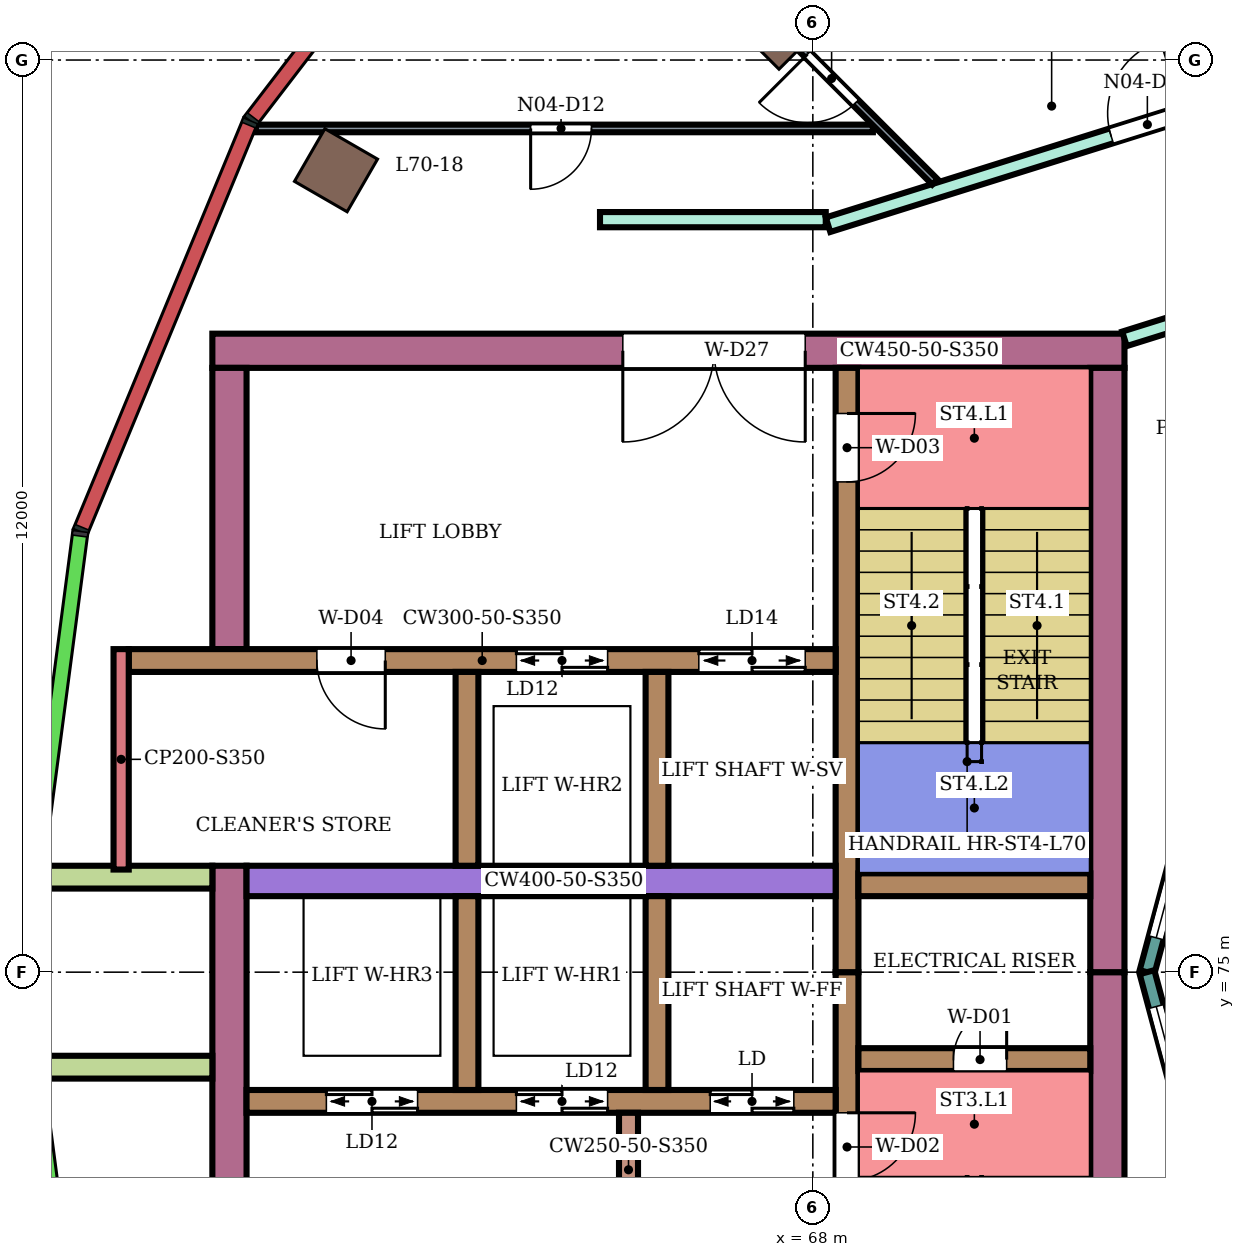
"""IFC4 building model, lengths in metres.
Left out: names, types, materials, properties, quantities, classifications, styles, units other than length and angle.
Written with IfcOpenShell. Run it as: python <this file> out.ifc"""

import sys

from ifc_helpers import new_model, si_unit, direction, frame, frame_2d, origin, origin_2d, place, context, subcontext, project, spatial, rectangle, extrude, element, fill, save


model = new_model("IFC4")
c1 = context("Model", 3, precision=1e-05, world=origin(), true_north=direction((0.0, 1.0)))
c2 = subcontext(c1, "Body", "Model", "MODEL_VIEW")
j1 = project(units=[si_unit("LENGTHUNIT", "METRE"), si_unit("PLANEANGLEUNIT", "RADIAN")], contexts=[c1])
p1 = place(None, origin())
s1 = spatial("IfcSite", under=j1, at=p1, CompositionType="ELEMENT")
p2 = place(p1, origin())
s2 = spatial("IfcBuilding", under=s1, at=p2, CompositionType="ELEMENT")
p3 = place(p2, frame((0.0, 0.0, 305.1)))
s3 = spatial("IfcBuildingStorey", under=s2, at=p3, CompositionType="ELEMENT", Elevation=305.1)
for number, where, z_axis, x_axis in (
    (1, (61.727, 85.55, 0.0), (0.0, 0.0, 1.0), (-0.866, 0.5, 0.0)),
    (2, (67.555, 87.445, 0.0), (0.0, 0.0, 1.0), (-0.707, 0.707, 0.0)),
):
    element("IfcColumn", number, at=place(p3, frame(where, z_axis=z_axis, x_axis=x_axis)), inside=s3, PredefinedType="COLUMN", context=c2, shape_type="SweptSolid", body=[
        extrude(rectangle(XDim=0.8, YDim=0.8, at=origin_2d()), origin(), (0.0, 0.0, 1.0), 4.2),
    ])
p4 = place(p3, frame((72.1, 83.175, 0.0), z_axis=(0.0, 0.0, 1.0), x_axis=(-1.0, 0.0, 0.0)))
e3 = element("IfcWall", 3, at=p4, inside=s3, PredefinedType="SHEAR", context=c2, shape_type="SweptSolid", body=[
    extrude(rectangle(XDim=12.0, YDim=0.45, at=frame_2d((6.0, 0.0))), origin(), (0.0, 0.0, 1.0), 3.85),
])
p5 = place(p4, frame((4.2, 0.0, 0.0)))
e4 = element("IfcOpeningElement", 4, at=p5, cuts=e3, PredefinedType="OPENING", context=c2, shape_type="SweptSolid", body=[
    extrude(rectangle(XDim=2.4, YDim=2.4, at=frame_2d((1.2, 1.2))), frame((0.0, 0.235, 0.0), z_axis=(0.0, -1.0, 0.0), x_axis=(1.0, 0.0, 0.0)), (0.0, 0.0, 1.0), 0.47),
])
for number, where, z_axis, x_axis in (
    (5, (71.875, 75.0, 0.0), (0.0, 0.0, 1.0), (0.0, -1.0, 0.0)),
    (6, (71.875, 82.95, 0.0), (0.0, 0.0, 1.0), (0.0, -1.0, 0.0)),
):
    element("IfcWall", number, at=place(p3, frame(where, z_axis=z_axis, x_axis=x_axis)), inside=s3, PredefinedType="SHEAR", context=c2, shape_type="SweptSolid", body=[
        extrude(rectangle(XDim=7.95, YDim=0.45, at=frame_2d((3.975, 0.0))), origin(), (0.0, 0.0, 1.0), 3.85),
    ])
p6 = place(p3, frame((60.325, 76.4, 0.0), z_axis=(0.0, 0.0, 1.0), x_axis=(0.0, -1.0, 0.0)))
e7 = element("IfcWall", 7, at=p6, inside=s3, PredefinedType="SHEAR", context=c2, shape_type="SweptSolid", body=[
    extrude(rectangle(XDim=9.35, YDim=0.45, at=frame_2d((4.675, 0.0))), origin(), (0.0, 0.0, 1.0), 3.85),
])
p7 = place(p3, frame((60.325, 82.95, 0.0), z_axis=(0.0, 0.0, 1.0), x_axis=(0.0, -1.0, 0.0)))
e8 = element("IfcWall", 8, at=p7, inside=s3, PredefinedType="SHEAR", context=c2, shape_type="SweptSolid", body=[
    extrude(rectangle(XDim=3.7, YDim=0.45, at=frame_2d((1.85, 0.0))), origin(), (0.0, 0.0, 1.0), 3.85),
])
p8 = place(p3, frame((68.45, 75.0, 0.0), z_axis=(0.0, 0.0, 1.0), x_axis=(0.0, -1.0, 0.0)))
e9 = element("IfcWall", 9, at=p8, inside=s3, PredefinedType="SHEAR", context=c2, shape_type="SweptSolid", body=[
    extrude(rectangle(XDim=7.95, YDim=0.3, at=frame_2d((3.975, 0.0))), origin(), (0.0, 0.0, 1.0), 3.85),
])
p9 = place(p8, frame((1.85, 0.0, 0.0)))
e10 = element("IfcOpeningElement", 10, at=p9, cuts=e9, PredefinedType="OPENING", context=c2, shape_type="SweptSolid", body=[
    extrude(rectangle(XDim=0.9, YDim=2.1, at=frame_2d((0.45, 1.05))), frame((0.0, 0.16, 0.0), z_axis=(0.0, -1.0, 0.0), x_axis=(1.0, 0.0, 0.0)), (0.0, 0.0, 1.0), 0.32),
])
p10 = place(p3, frame((68.45, 82.95, 0.0), z_axis=(0.0, 0.0, 1.0), x_axis=(0.0, -1.0, 0.0)))
e11 = element("IfcWall", 11, at=p10, inside=s3, PredefinedType="SHEAR", context=c2, shape_type="SweptSolid", body=[
    extrude(rectangle(XDim=7.95, YDim=0.3, at=frame_2d((3.975, 0.0))), origin(), (0.0, 0.0, 1.0), 3.85),
])
p11 = place(p10, frame((0.6, 0.0, 0.0)))
e12 = element("IfcOpeningElement", 12, at=p11, cuts=e11, PredefinedType="OPENING", context=c2, shape_type="SweptSolid", body=[
    extrude(rectangle(XDim=0.9, YDim=2.1, at=frame_2d((0.45, 1.05))), frame((0.0, 0.16, 0.0), z_axis=(0.0, -1.0, 0.0), x_axis=(1.0, 0.0, 0.0)), (0.0, 0.0, 1.0), 0.32),
])
p12 = place(p3, frame((71.65, 73.85, 0.0), z_axis=(0.0, 0.0, 1.0), x_axis=(-1.0, 0.0, 0.0)))
e13 = element("IfcWall", 13, at=p12, inside=s3, PredefinedType="SHEAR", context=c2, shape_type="SweptSolid", body=[
    extrude(rectangle(XDim=3.05, YDim=0.3, at=frame_2d((1.525, 0.0))), origin(), (0.0, 0.0, 1.0), 3.85),
])
p13 = place(p12, frame((1.1, 0.0, 0.0)))
e14 = element("IfcOpeningElement", 14, at=p13, cuts=e13, PredefinedType="OPENING", context=c2, shape_type="SweptSolid", body=[
    extrude(rectangle(XDim=0.7, YDim=2.0, at=frame_2d((0.35, 1.0))), frame((0.0, 0.16, 0.0), z_axis=(0.0, -1.0, 0.0), x_axis=(1.0, 0.0, 0.0)), (0.0, 0.0, 1.0), 0.32),
])
p14 = place(p3, frame((71.65, 76.15, 0.0), z_axis=(0.0, 0.0, 1.0), x_axis=(-1.0, 0.0, 0.0)))
e15 = element("IfcWall", 15, at=p14, inside=s3, PredefinedType="SHEAR", context=c2, shape_type="SweptSolid", body=[
    extrude(rectangle(XDim=3.05, YDim=0.3, at=frame_2d((1.525, 0.0))), origin(), (0.0, 0.0, 1.0), 3.85),
])
p15 = place(p3, frame((68.3, 73.3, 0.0), z_axis=(0.0, 0.0, 1.0), x_axis=(-1.0, 0.0, 0.0)))
e16 = element("IfcWall", 16, at=p15, inside=s3, PredefinedType="SHEAR", context=c2, shape_type="SweptSolid", body=[
    extrude(rectangle(XDim=7.75, YDim=0.3, at=frame_2d((3.875, 0.0))), origin(), (0.0, 0.0, 1.0), 3.85),
])
p16 = place(p15, frame((0.55, 0.0, 0.0)))
e17 = element("IfcOpeningElement", 17, at=p16, cuts=e16, PredefinedType="OPENING", context=c2, shape_type="SweptSolid", body=[
    extrude(rectangle(XDim=1.1, YDim=2.1, at=frame_2d((0.55, 1.05))), frame((0.0, 0.16, 0.0), z_axis=(0.0, -1.0, 0.0), x_axis=(1.0, 0.0, 0.0)), (0.0, 0.0, 1.0), 0.32),
])
p17 = place(p15, frame((3.0, 0.0, 0.0)))
e18 = element("IfcOpeningElement", 18, at=p17, cuts=e16, PredefinedType="OPENING", context=c2, shape_type="SweptSolid", body=[
    extrude(rectangle(XDim=1.2, YDim=2.1, at=frame_2d((0.6, 1.05))), frame((0.0, 0.16, 0.0), z_axis=(0.0, -1.0, 0.0), x_axis=(1.0, 0.0, 0.0)), (0.0, 0.0, 1.0), 0.32),
])
p18 = place(p15, frame((5.5, 0.0, 0.0)))
e19 = element("IfcOpeningElement", 19, at=p18, cuts=e16, PredefinedType="OPENING", context=c2, shape_type="SweptSolid", body=[
    extrude(rectangle(XDim=1.2, YDim=2.1, at=frame_2d((0.6, 1.05))), frame((0.0, 0.16, 0.0), z_axis=(0.0, -1.0, 0.0), x_axis=(1.0, 0.0, 0.0)), (0.0, 0.0, 1.0), 0.32),
])
p19 = place(p3, frame((68.3, 76.2, 0.0), z_axis=(0.0, 0.0, 1.0), x_axis=(-1.0, 0.0, 0.0)))
e20 = element("IfcWall", 20, at=p19, inside=s3, PredefinedType="SHEAR", context=c2, shape_type="SweptSolid", body=[
    extrude(rectangle(XDim=7.75, YDim=0.4, at=frame_2d((3.875, 0.0))), origin(), (0.0, 0.0, 1.0), 3.85),
])
p20 = place(p3, frame((68.3, 79.1, 0.0), z_axis=(0.0, 0.0, 1.0), x_axis=(-1.0, 0.0, 0.0)))
e21 = element("IfcWall", 21, at=p20, inside=s3, PredefinedType="SHEAR", context=c2, shape_type="SweptSolid", body=[
    extrude(rectangle(XDim=9.3, YDim=0.3, at=frame_2d((4.65, 0.0))), origin(), (0.0, 0.0, 1.0), 3.85),
])
p21 = place(p20, frame((0.4, 0.0, 0.0)))
e22 = element("IfcOpeningElement", 22, at=p21, cuts=e21, PredefinedType="OPENING", context=c2, shape_type="SweptSolid", body=[
    extrude(rectangle(XDim=1.4, YDim=2.1, at=frame_2d((0.7, 1.05))), frame((0.0, 0.16, 0.0), z_axis=(0.0, -1.0, 0.0), x_axis=(1.0, 0.0, 0.0)), (0.0, 0.0, 1.0), 0.32),
])
p22 = place(p20, frame((3.0, 0.0, 0.0)))
e23 = element("IfcOpeningElement", 23, at=p22, cuts=e21, PredefinedType="OPENING", context=c2, shape_type="SweptSolid", body=[
    extrude(rectangle(XDim=1.2, YDim=2.1, at=frame_2d((0.6, 1.05))), frame((0.0, 0.16, 0.0), z_axis=(0.0, -1.0, 0.0), x_axis=(1.0, 0.0, 0.0)), (0.0, 0.0, 1.0), 0.32),
])
p23 = place(p20, frame((5.925, 0.0, 0.0)))
e24 = element("IfcOpeningElement", 24, at=p23, cuts=e21, PredefinedType="OPENING", context=c2, shape_type="SweptSolid", body=[
    extrude(rectangle(XDim=0.9, YDim=2.1, at=frame_2d((0.45, 1.05))), frame((0.0, 0.16, 0.0), z_axis=(0.0, -1.0, 0.0), x_axis=(1.0, 0.0, 0.0)), (0.0, 0.0, 1.0), 0.32),
])
for number, where, z_axis, x_axis in (
    (25, (65.95, 76.0, 0.0), (0.0, 0.0, 1.0), (0.0, -1.0, 0.0)),
    (26, (63.45, 76.0, 0.0), (0.0, 0.0, 1.0), (0.0, -1.0, 0.0)),
    (27, (65.95, 78.95, 0.0), (0.0, 0.0, 1.0), (0.0, -1.0, 0.0)),
    (28, (63.45, 78.95, 0.0), (0.0, 0.0, 1.0), (0.0, -1.0, 0.0)),
):
    element("IfcWall", number, at=place(p3, frame(where, z_axis=z_axis, x_axis=x_axis)), inside=s3, PredefinedType="SHEAR", context=c2, shape_type="SweptSolid", body=[
        extrude(rectangle(XDim=2.55, YDim=0.3, at=frame_2d((1.275, 0.0))), origin(), (0.0, 0.0, 1.0), 3.85),
    ])
p24 = place(p3, frame((65.575, 73.15, 0.0), z_axis=(0.0, 0.0, 1.0), x_axis=(0.0, -1.0, 0.0)))
e29 = element("IfcWall", 29, at=p24, inside=s3, PredefinedType="SHEAR", context=c2, shape_type="SweptSolid", body=[
    extrude(rectangle(XDim=1.5, YDim=0.25, at=frame_2d((0.75, 0.0))), origin(), (0.0, 0.0, 1.0), 3.85),
])
for number, where, z_axis, x_axis in (
    (30, (60.1, 76.25, 0.0), (0.0, 0.0, 1.0), (-1.0, 0.0, 0.0)),
    (31, (60.1, 73.75, 0.0), (0.0, 0.0, 1.0), (-1.0, 0.0, 0.0)),
):
    element("IfcWall", number, at=place(p3, frame(where, z_axis=z_axis, x_axis=x_axis)), inside=s3, PredefinedType="NOTDEFINED", context=c2, shape_type="SweptSolid", body=[
        extrude(rectangle(XDim=2.416, YDim=0.3, at=frame_2d((1.208, 0.0))), origin(), (0.0, 0.0, 1.0), 4.2),
    ])
p25 = place(p3, frame((73.415, 78.802, 0.0), z_axis=(0.0, 0.0, 1.0), x_axis=(-0.258789828301, -0.965933654434, 0.0)))
e32 = element("IfcWall", 32, at=p25, inside=s3, PredefinedType="NOTDEFINED", context=c2, shape_type="SweptSolid", body=[
    extrude(rectangle(XDim=3.936, YDim=0.2, at=frame_2d((1.968, 0.0))), origin(), (0.0, 0.0, 1.0), 4.2),
])
p26 = place(p25, frame((0.468, 0.0, 0.9)))
e33 = element("IfcOpeningElement", 33, at=p26, cuts=e32, PredefinedType="OPENING", context=c2, shape_type="SweptSolid", body=[
    extrude(rectangle(XDim=3.0, YDim=2.3, at=frame_2d((1.5, 1.15))), frame((0.0, 0.11, 0.0), z_axis=(0.0, -1.0, 0.0), x_axis=(1.0, 0.0, 0.0)), (0.0, 0.0, 1.0), 0.22),
])
p27 = place(p3, frame((72.396, 75.0, 0.0), z_axis=(0.0, 0.0, 1.0), x_axis=(0.258789828301, -0.965933654434, 0.0)))
e34 = element("IfcWall", 34, at=p27, inside=s3, PredefinedType="NOTDEFINED", context=c2, shape_type="SweptSolid", body=[
    extrude(rectangle(XDim=3.936, YDim=0.2, at=frame_2d((1.968, 0.0))), origin(), (0.0, 0.0, 1.0), 4.2),
])
p28 = place(p27, frame((0.468, 0.0, 0.9)))
e35 = element("IfcOpeningElement", 35, at=p28, cuts=e34, PredefinedType="OPENING", context=c2, shape_type="SweptSolid", body=[
    extrude(rectangle(XDim=3.0, YDim=2.3, at=frame_2d((1.5, 1.15))), frame((0.0, 0.11, 0.0), z_axis=(0.0, -1.0, 0.0), x_axis=(1.0, 0.0, 0.0)), (0.0, 0.0, 1.0), 0.22),
])
p29 = place(p3, frame((65.2, 84.9, 0.0), z_axis=(0.0, 0.0, 1.0), x_axis=(1.0, 0.0, 0.0)))
e36 = element("IfcWall", 36, at=p29, inside=s3, PredefinedType="PARTITIONING", context=c2, shape_type="SweptSolid", body=[
    extrude(rectangle(XDim=2.97, YDim=0.2, at=frame_2d((1.485, 0.0))), origin(), (0.0, 0.0, 1.0), 3.75),
])
p30 = place(p3, frame((68.2, 84.833, 0.0), z_axis=(0.0, 0.0, 1.0), x_axis=(0.954191968402, 0.299195065863, 0.0)))
e37 = element("IfcWall", 37, at=p30, inside=s3, PredefinedType="PARTITIONING", context=c2, shape_type="SweptSolid", body=[
    extrude(rectangle(XDim=5.74, YDim=0.2, at=frame_2d((2.87, 0.0))), origin(), (0.0, 0.0, 1.0), 3.75),
])
p31 = place(p30, frame((3.903, 0.0, 0.0)))
e38 = element("IfcOpeningElement", 38, at=p31, cuts=e37, PredefinedType="OPENING", context=c2, shape_type="SweptSolid", body=[
    extrude(rectangle(XDim=1.0, YDim=2.1, at=frame_2d((0.5, 1.05))), frame((0.0, 0.11, 0.0), z_axis=(0.0, -1.0, 0.0), x_axis=(1.0, 0.0, 0.0)), (0.0, 0.0, 1.0), 0.22),
])
p32 = place(p3, frame((68.854, 94.312, 0.0), z_axis=(0.0, 0.0, 1.0), x_axis=(0.499901994742, -0.866081979753, 0.0)))
e39 = element("IfcWall", 39, at=p32, inside=s3, PredefinedType="PARTITIONING", context=c2, shape_type="SweptSolid", body=[
    extrude(rectangle(XDim=8.946, YDim=0.2, at=frame_2d((4.473, 0.0))), origin(), (0.0, 0.0, 1.0), 3.75),
])
p33 = place(p3, frame((72.1, 83.332, 0.0), z_axis=(0.0, 0.0, 1.0), x_axis=(0.954233106619, 0.299063836383, 0.0)))
e40 = element("IfcWall", 40, at=p33, inside=s3, PredefinedType="PARTITIONING", context=c2, shape_type="SweptSolid", body=[
    extrude(rectangle(XDim=2.414, YDim=0.2, at=frame_2d((1.207, 0.0))), origin(), (0.0, 0.0, 1.0), 3.75),
])
p34 = place(p33, frame((0.762, 0.0, 0.0)))
e41 = element("IfcOpeningElement", 41, at=p34, cuts=e40, PredefinedType="OPENING", context=c2, shape_type="SweptSolid", body=[
    extrude(rectangle(XDim=0.9, YDim=2.1, at=frame_2d((0.45, 1.05))), frame((0.0, 0.11, 0.0), z_axis=(0.0, -1.0, 0.0), x_axis=(1.0, 0.0, 0.0)), (0.0, 0.0, 1.0), 0.22),
])
p35 = place(p3, frame((60.673, 86.1, 0.0), z_axis=(0.0, 0.0, 1.0), x_axis=(1.0, 0.0, 0.0)))
e42 = element("IfcWall", 42, at=p35, inside=s3, PredefinedType="PARTITIONING", context=c2, shape_type="SweptSolid", body=[
    extrude(rectangle(XDim=8.117, YDim=0.1, at=frame_2d((4.059, 0.0))), origin(), (0.0, 0.0, 1.0), 3.75),
])
p36 = place(p35, frame((3.615, 0.0, 0.0)))
e43 = element("IfcOpeningElement", 43, at=p36, cuts=e42, PredefinedType="OPENING", context=c2, shape_type="SweptSolid", body=[
    extrude(rectangle(XDim=0.8, YDim=2.1, at=frame_2d((0.4, 1.05))), frame((0.0, 0.06, 0.0), z_axis=(0.0, -1.0, 0.0), x_axis=(1.0, 0.0, 0.0)), (0.0, 0.0, 1.0), 0.12),
])
p37 = place(p3, frame((66.073, 88.932, 0.0), z_axis=(0.0, 0.0, 1.0), x_axis=(0.70696025587, -0.707253276147, 0.0)))
e44 = element("IfcWall", 44, at=p37, inside=s3, PredefinedType="PARTITIONING", context=c2, shape_type="SweptSolid", body=[
    extrude(rectangle(XDim=4.999, YDim=0.1, at=frame_2d((2.5, 0.0))), origin(), (0.0, 0.0, 1.0), 3.75),
])
p38 = place(p37, frame((2.626, 0.0, 0.0)))
e45 = element("IfcOpeningElement", 45, at=p38, cuts=e44, PredefinedType="OPENING", context=c2, shape_type="SweptSolid", body=[
    extrude(rectangle(XDim=0.9, YDim=2.1, at=frame_2d((0.45, 1.05))), frame((0.0, 0.06, 0.0), z_axis=(0.0, -1.0, 0.0), x_axis=(1.0, 0.0, 0.0)), (0.0, 0.0, 1.0), 0.12),
])
p39 = place(p3, frame((58.9, 79.25, 0.0), z_axis=(0.0, 0.0, 1.0), x_axis=(0.0, -1.0, 0.0)))
e46 = element("IfcWall", 46, at=p39, inside=s3, PredefinedType="PARTITIONING", context=c2, shape_type="SweptSolid", body=[
    extrude(rectangle(XDim=2.9, YDim=0.2, at=frame_2d((1.45, 0.0))), origin(), (0.0, 0.0, 1.0), 3.85),
])
p40 = place(p26, origin())
e47 = element("IfcWindow", 47, at=p40, inside=s3, PartitioningType="SINGLE_PANEL", PredefinedType="WINDOW", context=c2, shape_type="SweptSolid", body=[
    extrude(rectangle(XDim=3.0, YDim=2.3, at=frame_2d((1.5, 1.15))), frame((0.0, 0.03, 0.0), z_axis=(0.0, -1.0, 0.0), x_axis=(1.0, 0.0, 0.0)), (0.0, 0.0, 1.0), 0.06),
])
fill(e33, e47)
p41 = place(p28, origin())
e48 = element("IfcWindow", 48, at=p41, inside=s3, PartitioningType="SINGLE_PANEL", PredefinedType="WINDOW", context=c2, shape_type="SweptSolid", body=[
    extrude(rectangle(XDim=3.0, YDim=2.3, at=frame_2d((1.5, 1.15))), frame((0.0, 0.03, 0.0), z_axis=(0.0, -1.0, 0.0), x_axis=(1.0, 0.0, 0.0)), (0.0, 0.0, 1.0), 0.06),
])
fill(e35, e48)
p42 = place(p31, origin())
e49 = element("IfcDoor", 49, at=p42, inside=s3, OperationType="SINGLE_SWING_RIGHT", PredefinedType="DOOR", context=c2, shape_type="SweptSolid", body=[
    extrude(rectangle(XDim=1.0, YDim=2.1, at=frame_2d((0.5, 1.05))), frame((0.0, 0.025, 0.0), z_axis=(0.0, -1.0, 0.0), x_axis=(1.0, 0.0, 0.0)), (0.0, 0.0, 1.0), 0.05),
])
fill(e38, e49)
p43 = place(p38, frame((0.9, 0.0, 0.0), z_axis=(0.0, 0.0, 1.0), x_axis=(-1.0, 0.0, 0.0)))
e50 = element("IfcDoor", 50, at=p43, inside=s3, OperationType="SINGLE_SWING_RIGHT", PredefinedType="DOOR", context=c2, shape_type="SweptSolid", body=[
    extrude(rectangle(XDim=0.9, YDim=2.1, at=frame_2d((0.45, 1.05))), frame((0.0, 0.025, 0.0), z_axis=(0.0, -1.0, 0.0), x_axis=(1.0, 0.0, 0.0)), (0.0, 0.0, 1.0), 0.05),
])
fill(e45, e50)
p44 = place(p36, frame((0.8, 0.0, 0.0), z_axis=(0.0, 0.0, 1.0), x_axis=(-1.0, 0.0, 0.0)))
e51 = element("IfcDoor", 51, at=p44, inside=s3, OperationType="SINGLE_SWING_RIGHT", PredefinedType="DOOR", context=c2, shape_type="SweptSolid", body=[
    extrude(rectangle(XDim=0.8, YDim=2.1, at=frame_2d((0.4, 1.05))), frame((0.0, 0.025, 0.0), z_axis=(0.0, -1.0, 0.0), x_axis=(1.0, 0.0, 0.0)), (0.0, 0.0, 1.0), 0.05),
])
fill(e43, e51)
p45 = place(p13, frame((0.7, 0.0, 0.0), z_axis=(0.0, 0.0, 1.0), x_axis=(-1.0, 0.0, 0.0)))
e52 = element("IfcDoor", 52, at=p45, inside=s3, OperationType="SINGLE_SWING_RIGHT", PredefinedType="DOOR", context=c2, shape_type="SweptSolid", body=[
    extrude(rectangle(XDim=0.7, YDim=2.0, at=frame_2d((0.35, 1.0))), frame((0.0, 0.025, 0.0), z_axis=(0.0, -1.0, 0.0), x_axis=(1.0, 0.0, 0.0)), (0.0, 0.0, 1.0), 0.05),
])
fill(e14, e52)
p46 = place(p9, origin())
e53 = element("IfcDoor", 53, at=p46, inside=s3, OperationType="SINGLE_SWING_LEFT", PredefinedType="DOOR", context=c2, shape_type="SweptSolid", body=[
    extrude(rectangle(XDim=0.9, YDim=2.1, at=frame_2d((0.45, 1.05))), frame((0.0, 0.025, 0.0), z_axis=(0.0, -1.0, 0.0), x_axis=(1.0, 0.0, 0.0)), (0.0, 0.0, 1.0), 0.05),
])
fill(e10, e53)
p47 = place(p11, origin())
e54 = element("IfcDoor", 54, at=p47, inside=s3, OperationType="SINGLE_SWING_LEFT", PredefinedType="DOOR", context=c2, shape_type="SweptSolid", body=[
    extrude(rectangle(XDim=0.9, YDim=2.1, at=frame_2d((0.45, 1.05))), frame((0.0, 0.025, 0.0), z_axis=(0.0, -1.0, 0.0), x_axis=(1.0, 0.0, 0.0)), (0.0, 0.0, 1.0), 0.05),
])
fill(e12, e54)
p48 = place(p16, origin())
e55 = element("IfcDoor", 55, at=p48, inside=s3, OperationType="DOUBLE_DOOR_SLIDING", PredefinedType="DOOR", context=c2, shape_type="SweptSolid", body=[
    extrude(rectangle(XDim=1.1, YDim=2.1, at=frame_2d((0.55, 1.05))), frame((0.0, 0.025, 0.0), z_axis=(0.0, -1.0, 0.0), x_axis=(1.0, 0.0, 0.0)), (0.0, 0.0, 1.0), 0.05),
])
fill(e17, e55)
p49 = place(p17, origin())
e56 = element("IfcDoor", 56, at=p49, inside=s3, OperationType="DOUBLE_DOOR_SLIDING", PredefinedType="DOOR", context=c2, shape_type="SweptSolid", body=[
    extrude(rectangle(XDim=1.2, YDim=2.1, at=frame_2d((0.6, 1.05))), frame((0.0, 0.025, 0.0), z_axis=(0.0, -1.0, 0.0), x_axis=(1.0, 0.0, 0.0)), (0.0, 0.0, 1.0), 0.05),
])
fill(e18, e56)
p50 = place(p18, origin())
e57 = element("IfcDoor", 57, at=p50, inside=s3, OperationType="DOUBLE_DOOR_SLIDING", PredefinedType="DOOR", context=c2, shape_type="SweptSolid", body=[
    extrude(rectangle(XDim=1.2, YDim=2.1, at=frame_2d((0.6, 1.05))), frame((0.0, 0.025, 0.0), z_axis=(0.0, -1.0, 0.0), x_axis=(1.0, 0.0, 0.0)), (0.0, 0.0, 1.0), 0.05),
])
fill(e19, e57)
p51 = place(p21, origin())
e58 = element("IfcDoor", 58, at=p51, inside=s3, OperationType="DOUBLE_DOOR_SLIDING", PredefinedType="DOOR", context=c2, shape_type="SweptSolid", body=[
    extrude(rectangle(XDim=1.4, YDim=2.1, at=frame_2d((0.7, 1.05))), frame((0.0, 0.025, 0.0), z_axis=(0.0, -1.0, 0.0), x_axis=(1.0, 0.0, 0.0)), (0.0, 0.0, 1.0), 0.05),
])
fill(e22, e58)
p52 = place(p22, origin())
e59 = element("IfcDoor", 59, at=p52, inside=s3, OperationType="DOUBLE_DOOR_SLIDING", PredefinedType="DOOR", context=c2, shape_type="SweptSolid", body=[
    extrude(rectangle(XDim=1.2, YDim=2.1, at=frame_2d((0.6, 1.05))), frame((0.0, 0.025, 0.0), z_axis=(0.0, -1.0, 0.0), x_axis=(1.0, 0.0, 0.0)), (0.0, 0.0, 1.0), 0.05),
])
fill(e23, e59)
p53 = place(p23, origin())
e60 = element("IfcDoor", 60, at=p53, inside=s3, OperationType="SINGLE_SWING_LEFT", PredefinedType="DOOR", context=c2, shape_type="SweptSolid", body=[
    extrude(rectangle(XDim=0.9, YDim=2.1, at=frame_2d((0.45, 1.05))), frame((0.0, 0.025, 0.0), z_axis=(0.0, -1.0, 0.0), x_axis=(1.0, 0.0, 0.0)), (0.0, 0.0, 1.0), 0.05),
])
fill(e24, e60)
p54 = place(p5, origin())
e61 = element("IfcDoor", 61, at=p54, inside=s3, OperationType="DOUBLE_DOOR_SINGLE_SWING", PredefinedType="DOOR", context=c2, shape_type="SweptSolid", body=[
    extrude(rectangle(XDim=2.4, YDim=2.4, at=frame_2d((1.2, 1.2))), frame((0.0, 0.025, 0.0), z_axis=(0.0, -1.0, 0.0), x_axis=(1.0, 0.0, 0.0)), (0.0, 0.0, 1.0), 0.05),
])
fill(e4, e61)
save(model, sys.argv[1])
